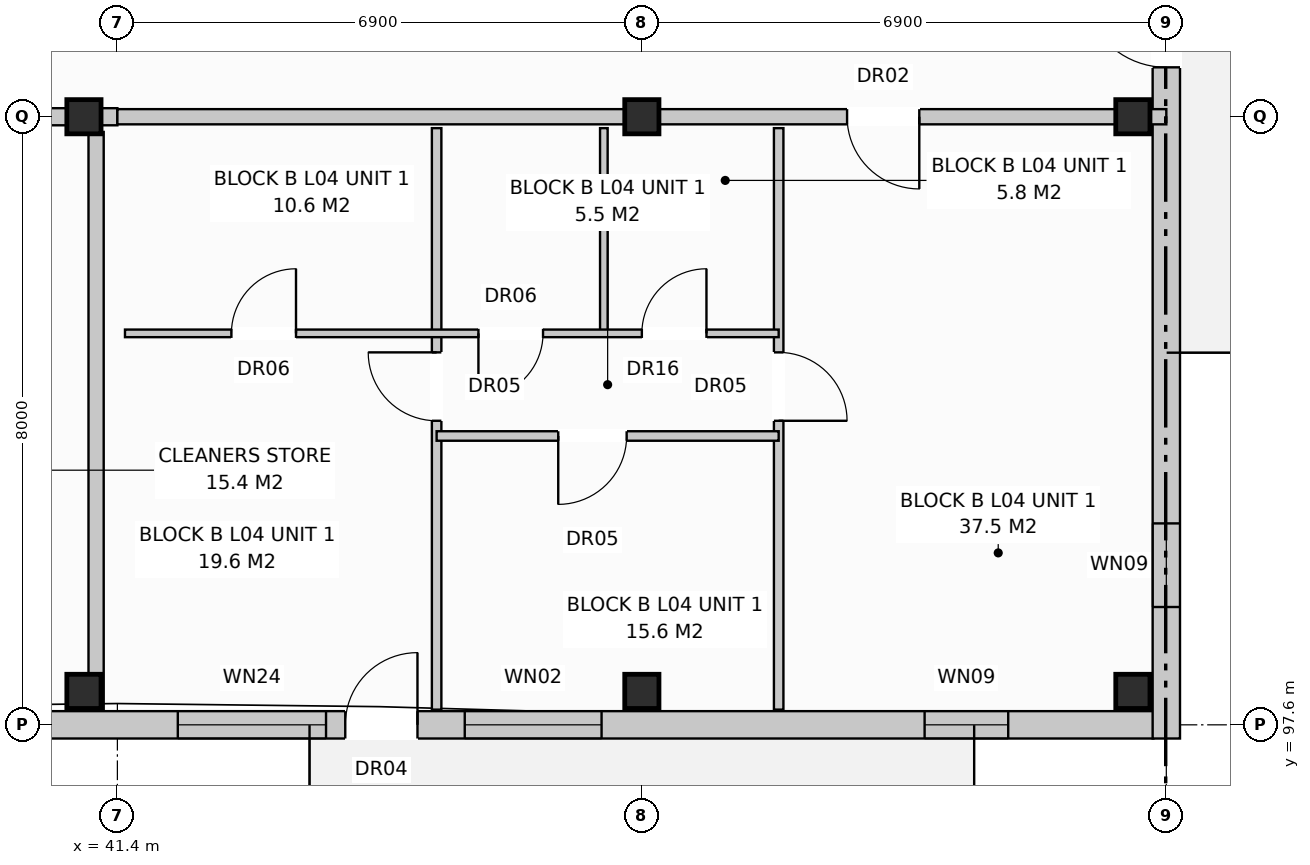
"""IFC4 building model, lengths in metres.
Left out: names, types, materials, properties, quantities, classifications, styles, units other than length and angle.
Written with IfcOpenShell. Run it as: python <this file> out.ifc"""

import sys

from ifc_helpers import new_model, si_unit, direction, frame, frame_2d, origin, origin_with_axes, origin_2d, place, context, subcontext, project, spatial, rectangle, extrude, element, fill, save


model = new_model("IFC4")
c1 = context("Model", 3, precision=1e-05, world=origin(), true_north=direction((0.0, 1.0)))
c2 = subcontext(c1, "Body", "Model", "MODEL_VIEW")
j1 = project(units=[si_unit("LENGTHUNIT", "METRE"), si_unit("PLANEANGLEUNIT", "RADIAN")], contexts=[c1])
p1 = place(None, origin())
s1 = spatial("IfcSite", under=j1, at=p1, CompositionType="ELEMENT")
p2 = place(p1, origin())
s2 = spatial("IfcBuilding", under=s1, at=p2, CompositionType="ELEMENT")
p3 = place(p2, frame((0.0, 0.0, 14.4)))
s3 = spatial("IfcBuildingStorey", under=s2, at=p3, CompositionType="ELEMENT", Elevation=14.4)
for number, where, z_axis, x_axis in (
    (1, (40.96, 98.04, 0.0), (0.0, 0.0, 1.0), (1.0, 0.0, 0.0)),
    (2, (40.96, 105.6, 0.0), (0.0, 0.0, 1.0), (1.0, 0.0, 0.0)),
    (3, (48.3, 98.04, 0.0), (0.0, 0.0, 1.0), (1.0, 0.0, 0.0)),
    (4, (48.3, 105.6, 0.0), (0.0, 0.0, 1.0), (1.0, 0.0, 0.0)),
    (5, (54.76, 98.04, 0.0), (0.0, 0.0, 1.0), (1.0, 0.0, 0.0)),
    (6, (54.76, 105.6, 0.0), (0.0, 0.0, 1.0), (1.0, 0.0, 0.0)),
):
    element("IfcColumn", number, at=place(p3, frame(where, z_axis=z_axis, x_axis=x_axis)), inside=s3, PredefinedType="COLUMN", context=c2, shape_type="SweptSolid", body=[
        extrude(rectangle(XDim=0.45, YDim=0.45, at=origin_2d()), origin(), (0.0, 0.0, 1.0), 3.2),
    ])
p4 = place(p3, frame((31.35, 97.6, 0.0), z_axis=(0.0, 0.0, 1.0), x_axis=(1.0, 0.0, 0.0)))
e7 = element("IfcWall", 7, at=p4, inside=s3, PredefinedType="STANDARD", context=c2, shape_type="SweptSolid", body=[
    extrude(rectangle(XDim=23.68, YDim=0.36, at=frame_2d((11.84, 0.0))), origin(), (0.0, 0.0, 1.0), 2.94),
])
p5 = place(p4, frame((13.048, 0.0, 0.0)))
e8 = element("IfcOpeningElement", 8, at=p5, cuts=e7, PredefinedType="OPENING", context=c2, shape_type="SweptSolid", body=[
    extrude(rectangle(XDim=0.95, YDim=2.1, at=frame_2d((0.475, 1.05))), frame((0.0, 0.192, 0.0), z_axis=(0.0, -1.0, 0.0), x_axis=(1.0, 0.0, 0.0)), (0.0, 0.0, 1.0), 0.384),
])
p6 = place(p4, frame((10.845, 0.0, 0.8)))
e9 = element("IfcOpeningElement", 9, at=p6, cuts=e7, PredefinedType="OPENING", context=c2, shape_type="SweptSolid", body=[
    extrude(rectangle(XDim=1.95, YDim=1.65, at=frame_2d((0.975, 0.825))), frame((0.0, 0.192, 0.0), z_axis=(0.0, -1.0, 0.0), x_axis=(1.0, 0.0, 0.0)), (0.0, 0.0, 1.0), 0.384),
])
p7 = place(p4, frame((14.62, 0.0, 0.8)))
e10 = element("IfcOpeningElement", 10, at=p7, cuts=e7, PredefinedType="OPENING", context=c2, shape_type="SweptSolid", body=[
    extrude(rectangle(XDim=1.8, YDim=1.7, at=frame_2d((0.9, 0.85))), frame((0.0, 0.192, 0.0), z_axis=(0.0, -1.0, 0.0), x_axis=(1.0, 0.0, 0.0)), (0.0, 0.0, 1.0), 0.384),
])
p8 = place(p4, frame((20.67, 0.0, 0.72)))
e11 = element("IfcOpeningElement", 11, at=p8, cuts=e7, PredefinedType="OPENING", context=c2, shape_type="SweptSolid", body=[
    extrude(rectangle(XDim=1.1, YDim=1.5, at=frame_2d((0.55, 0.75))), frame((0.0, 0.192, 0.0), z_axis=(0.0, -1.0, 0.0), x_axis=(1.0, 0.0, 0.0)), (0.0, 0.0, 1.0), 0.384),
])
p9 = place(p3, frame((55.2, 97.42, 0.0), z_axis=(0.0, 0.0, 1.0), x_axis=(0.0, 1.0, 0.0)))
e12 = element("IfcWall", 12, at=p9, inside=s3, PredefinedType="STANDARD", context=c2, shape_type="SweptSolid", body=[
    extrude(rectangle(XDim=18.76, YDim=0.36, at=frame_2d((9.38, 0.0))), origin(), (0.0, 0.0, 1.0), 2.94),
])
p10 = place(p9, frame((8.83, 0.0, 0.0)))
e13 = element("IfcOpeningElement", 13, at=p10, cuts=e12, PredefinedType="OPENING", context=c2, shape_type="SweptSolid", body=[
    extrude(rectangle(XDim=1.1, YDim=2.1, at=frame_2d((0.55, 1.05))), frame((0.0, 0.192, 0.0), z_axis=(0.0, -1.0, 0.0), x_axis=(1.0, 0.0, 0.0)), (0.0, 0.0, 1.0), 0.384),
])
p11 = place(p9, frame((1.73, 0.0, 0.72)))
e14 = element("IfcOpeningElement", 14, at=p11, cuts=e12, PredefinedType="OPENING", context=c2, shape_type="SweptSolid", body=[
    extrude(rectangle(XDim=1.1, YDim=1.5, at=frame_2d((0.55, 0.75))), frame((0.0, 0.192, 0.0), z_axis=(0.0, -1.0, 0.0), x_axis=(1.0, 0.0, 0.0)), (0.0, 0.0, 1.0), 0.384),
])
p12 = place(p9, frame((15.93, 0.0, 0.72)))
e15 = element("IfcOpeningElement", 15, at=p12, cuts=e12, PredefinedType="OPENING", context=c2, shape_type="SweptSolid", body=[
    extrude(rectangle(XDim=1.1, YDim=1.5, at=frame_2d((0.55, 0.75))), frame((0.0, 0.192, 0.0), z_axis=(0.0, -1.0, 0.0), x_axis=(1.0, 0.0, 0.0)), (0.0, 0.0, 1.0), 0.384),
])
p13 = place(p3, frame((41.12, 97.8, 0.0), z_axis=(0.0, 0.0, 1.0), x_axis=(0.0, 1.0, 0.0)))
e16 = element("IfcWall", 16, at=p13, inside=s3, PredefinedType="PARTITIONING", context=c2, shape_type="SweptSolid", body=[
    extrude(rectangle(XDim=7.6, YDim=0.2, at=frame_2d((3.8, 0.0))), origin(), (0.0, 0.0, 1.0), 2.94),
])
p14 = place(p3, frame((31.5, 105.6, 0.0), z_axis=(0.0, 0.0, 1.0), x_axis=(1.0, 0.0, 0.0)))
e17 = element("IfcWall", 17, at=p14, inside=s3, PredefinedType="PARTITIONING", context=c2, shape_type="SweptSolid", body=[
    extrude(rectangle(XDim=9.9, YDim=0.225, at=frame_2d((4.95, 0.0))), origin(), (0.0, 0.0, 1.0), 2.38),
])
p15 = place(p14, frame((0.475, 0.0, 0.0)))
e18 = element("IfcOpeningElement", 18, at=p15, cuts=e17, PredefinedType="OPENING", context=c2, shape_type="SweptSolid", body=[
    extrude(rectangle(XDim=1.1, YDim=2.15, at=frame_2d((0.55, 1.075))), frame((0.0, 0.125, 0.0), z_axis=(0.0, -1.0, 0.0), x_axis=(1.0, 0.0, 0.0)), (0.0, 0.0, 1.0), 0.249),
])
p16 = place(p14, frame((5.75, 0.0, 0.0)))
e19 = element("IfcOpeningElement", 19, at=p16, cuts=e17, PredefinedType="OPENING", context=c2, shape_type="SweptSolid", body=[
    extrude(rectangle(XDim=0.9, YDim=2.1, at=frame_2d((0.45, 1.05))), frame((0.0, 0.125, 0.0), z_axis=(0.0, -1.0, 0.0), x_axis=(1.0, 0.0, 0.0)), (0.0, 0.0, 1.0), 0.249),
])
p17 = place(p14, frame((7.8, 0.0, 0.0)))
e20 = element("IfcOpeningElement", 20, at=p17, cuts=e17, PredefinedType="OPENING", context=c2, shape_type="SweptSolid", body=[
    extrude(rectangle(XDim=0.95, YDim=2.15, at=frame_2d((0.475, 1.075))), frame((0.0, 0.125, 0.0), z_axis=(0.0, -1.0, 0.0), x_axis=(1.0, 0.0, 0.0)), (0.0, 0.0, 1.0), 0.249),
])
p18 = place(p3, frame((41.4, 105.6, 0.0), z_axis=(0.0, 0.0, 1.0), x_axis=(1.0, 0.0, 0.0)))
e21 = element("IfcWall", 21, at=p18, inside=s3, PredefinedType="PARTITIONING", context=c2, shape_type="SweptSolid", body=[
    extrude(rectangle(XDim=13.8, YDim=0.2, at=frame_2d((6.9, 0.0))), origin(), (0.0, 0.0, 1.0), 2.38),
])
p19 = place(p18, frame((9.6, 0.0, 0.0)))
e22 = element("IfcOpeningElement", 22, at=p19, cuts=e21, PredefinedType="OPENING", context=c2, shape_type="SweptSolid", body=[
    extrude(rectangle(XDim=0.95, YDim=2.15, at=frame_2d((0.475, 1.075))), frame((0.0, 0.112, 0.0), z_axis=(0.0, -1.0, 0.0), x_axis=(1.0, 0.0, 0.0)), (0.0, 0.0, 1.0), 0.224),
])
p20 = place(p3, frame((50.1, 105.45, 0.0), z_axis=(0.0, 0.0, 1.0), x_axis=(0.0, -1.0, 0.0)))
e23 = element("IfcWall", 23, at=p20, inside=s3, PredefinedType="PARTITIONING", context=c2, shape_type="SweptSolid", body=[
    extrude(rectangle(XDim=7.65, YDim=0.125, at=frame_2d((3.825, 0.0))), origin(), (0.0, 0.0, 1.0), 2.94),
])
p21 = place(p20, frame((2.95, 0.0, 0.0)))
e24 = element("IfcOpeningElement", 24, at=p21, cuts=e23, PredefinedType="OPENING", context=c2, shape_type="SweptSolid", body=[
    extrude(rectangle(XDim=0.9, YDim=2.1, at=frame_2d((0.45, 1.05))), frame((0.0, 0.074, 0.0), z_axis=(0.0, -1.0, 0.0), x_axis=(1.0, 0.0, 0.0)), (0.0, 0.0, 1.0), 0.149),
])
p22 = place(p3, frame((45.6, 105.45, 0.0), z_axis=(0.0, 0.0, 1.0), x_axis=(0.0, -1.0, 0.0)))
e25 = element("IfcWall", 25, at=p22, inside=s3, PredefinedType="PARTITIONING", context=c2, shape_type="SweptSolid", body=[
    extrude(rectangle(XDim=7.65, YDim=0.125, at=frame_2d((3.825, 0.0))), origin(), (0.0, 0.0, 1.0), 2.94),
])
p23 = place(p22, frame((2.95, 0.0, 0.0)))
e26 = element("IfcOpeningElement", 26, at=p23, cuts=e25, PredefinedType="OPENING", context=c2, shape_type="SweptSolid", body=[
    extrude(rectangle(XDim=0.9, YDim=2.1, at=frame_2d((0.45, 1.05))), frame((0.0, 0.074, 0.0), z_axis=(0.0, -1.0, 0.0), x_axis=(1.0, 0.0, 0.0)), (0.0, 0.0, 1.0), 0.149),
])
p24 = place(p3, frame((47.8, 105.45, 0.0), z_axis=(0.0, 0.0, 1.0), x_axis=(0.0, -1.0, 0.0)))
e27 = element("IfcWall", 27, at=p24, inside=s3, PredefinedType="PARTITIONING", context=c2, shape_type="SweptSolid", body=[
    extrude(rectangle(XDim=2.7, YDim=0.1, at=frame_2d((1.35, 0.0))), origin(), (0.0, 0.0, 1.0), 2.94),
])
p25 = place(p3, frame((41.5, 102.75, 0.0), z_axis=(0.0, 0.0, 1.0), x_axis=(1.0, 0.0, 0.0)))
e28 = element("IfcWall", 28, at=p25, inside=s3, PredefinedType="PARTITIONING", context=c2, shape_type="SweptSolid", body=[
    extrude(rectangle(XDim=8.6, YDim=0.1, at=frame_2d((4.3, 0.0))), origin(), (0.0, 0.0, 1.0), 2.94),
])
p26 = place(p25, frame((1.4, 0.0, 0.0)))
e29 = element("IfcOpeningElement", 29, at=p26, cuts=e28, PredefinedType="OPENING", context=c2, shape_type="SweptSolid", body=[
    extrude(rectangle(XDim=0.85, YDim=2.05, at=frame_2d((0.425, 1.025))), frame((0.0, 0.062, 0.0), z_axis=(0.0, -1.0, 0.0), x_axis=(1.0, 0.0, 0.0)), (0.0, 0.0, 1.0), 0.124),
])
p27 = place(p25, frame((4.65, 0.0, 0.0)))
e30 = element("IfcOpeningElement", 30, at=p27, cuts=e28, PredefinedType="OPENING", context=c2, shape_type="SweptSolid", body=[
    extrude(rectangle(XDim=0.85, YDim=2.05, at=frame_2d((0.425, 1.025))), frame((0.0, 0.062, 0.0), z_axis=(0.0, -1.0, 0.0), x_axis=(1.0, 0.0, 0.0)), (0.0, 0.0, 1.0), 0.124),
])
p28 = place(p25, frame((6.8, 0.0, 0.0)))
e31 = element("IfcOpeningElement", 31, at=p28, cuts=e28, PredefinedType="OPENING", context=c2, shape_type="SweptSolid", body=[
    extrude(rectangle(XDim=0.85, YDim=2.1, at=frame_2d((0.425, 1.05))), frame((0.0, 0.062, 0.0), z_axis=(0.0, -1.0, 0.0), x_axis=(1.0, 0.0, 0.0)), (0.0, 0.0, 1.0), 0.124),
])
p29 = place(p3, frame((45.6, 101.4, 0.0), z_axis=(0.0, 0.0, 1.0), x_axis=(1.0, 0.0, 0.0)))
e32 = element("IfcWall", 32, at=p29, inside=s3, PredefinedType="PARTITIONING", context=c2, shape_type="SweptSolid", body=[
    extrude(rectangle(XDim=4.5, YDim=0.125, at=frame_2d((2.25, 0.0))), origin(), (0.0, 0.0, 1.0), 2.94),
])
p30 = place(p29, frame((1.6, 0.0, 0.0)))
e33 = element("IfcOpeningElement", 33, at=p30, cuts=e32, PredefinedType="OPENING", context=c2, shape_type="SweptSolid", body=[
    extrude(rectangle(XDim=0.9, YDim=2.1, at=frame_2d((0.45, 1.05))), frame((0.0, 0.074, 0.0), z_axis=(0.0, -1.0, 0.0), x_axis=(1.0, 0.0, 0.0)), (0.0, 0.0, 1.0), 0.149),
])
p31 = place(p5, origin_with_axes())
e34 = element("IfcDoor", 34, at=p31, inside=s3, OperationType="SINGLE_SWING_RIGHT", PredefinedType="DOOR", context=c2, shape_type="SweptSolid", body=[
    extrude(rectangle(XDim=0.95, YDim=2.1, at=frame_2d((0.475, 1.05))), frame((0.0, 0.025, 0.0), z_axis=(0.0, -1.0, 0.0), x_axis=(1.0, 0.0, 0.0)), (0.0, 0.0, 1.0), 0.05),
])
fill(e8, e34)
p32 = place(p6, origin_with_axes())
e35 = element("IfcWindow", 35, at=p32, inside=s3, PartitioningType="SINGLE_PANEL", PredefinedType="WINDOW", context=c2, shape_type="SweptSolid", body=[
    extrude(rectangle(XDim=1.95, YDim=1.65, at=frame_2d((0.975, 0.825))), frame((0.0, 0.03, 0.0), z_axis=(0.0, -1.0, 0.0), x_axis=(1.0, 0.0, 0.0)), (0.0, 0.0, 1.0), 0.06),
])
fill(e9, e35)
p33 = place(p7, origin_with_axes())
e36 = element("IfcWindow", 36, at=p33, inside=s3, PartitioningType="SINGLE_PANEL", PredefinedType="WINDOW", context=c2, shape_type="SweptSolid", body=[
    extrude(rectangle(XDim=1.8, YDim=1.7, at=frame_2d((0.9, 0.85))), frame((0.0, 0.03, 0.0), z_axis=(0.0, -1.0, 0.0), x_axis=(1.0, 0.0, 0.0)), (0.0, 0.0, 1.0), 0.06),
])
fill(e10, e36)
p34 = place(p8, origin_with_axes())
e37 = element("IfcWindow", 37, at=p34, inside=s3, PartitioningType="SINGLE_PANEL", PredefinedType="WINDOW", context=c2, shape_type="SweptSolid", body=[
    extrude(rectangle(XDim=1.1, YDim=1.5, at=frame_2d((0.55, 0.75))), frame((0.0, 0.03, 0.0), z_axis=(0.0, -1.0, 0.0), x_axis=(1.0, 0.0, 0.0)), (0.0, 0.0, 1.0), 0.06),
])
fill(e11, e37)
p35 = place(p10, origin_with_axes())
e38 = element("IfcDoor", 38, at=p35, inside=s3, OperationType="SINGLE_SWING_RIGHT", PredefinedType="DOOR", context=c2, shape_type="SweptSolid", body=[
    extrude(rectangle(XDim=1.1, YDim=2.1, at=frame_2d((0.55, 1.05))), frame((0.0, 0.025, 0.0), z_axis=(0.0, -1.0, 0.0), x_axis=(1.0, 0.0, 0.0)), (0.0, 0.0, 1.0), 0.05),
])
fill(e13, e38)
p36 = place(p11, origin_with_axes())
e39 = element("IfcWindow", 39, at=p36, inside=s3, PartitioningType="SINGLE_PANEL", PredefinedType="WINDOW", context=c2, shape_type="SweptSolid", body=[
    extrude(rectangle(XDim=1.1, YDim=1.5, at=frame_2d((0.55, 0.75))), frame((0.0, 0.03, 0.0), z_axis=(0.0, -1.0, 0.0), x_axis=(1.0, 0.0, 0.0)), (0.0, 0.0, 1.0), 0.06),
])
fill(e14, e39)
p37 = place(p19, frame((0.95, 0.0, 0.0), z_axis=(0.0, 0.0, 1.0), x_axis=(-1.0, 0.0, 0.0)))
e40 = element("IfcDoor", 40, at=p37, inside=s3, OperationType="SINGLE_SWING_RIGHT", PredefinedType="DOOR", context=c2, shape_type="SweptSolid", body=[
    extrude(rectangle(XDim=0.95, YDim=2.15, at=frame_2d((0.475, 1.075))), frame((0.0, 0.025, 0.0), z_axis=(0.0, -1.0, 0.0), x_axis=(1.0, 0.0, 0.0)), (0.0, 0.0, 1.0), 0.05),
])
fill(e22, e40)
p38 = place(p21, origin_with_axes())
e41 = element("IfcDoor", 41, at=p38, inside=s3, OperationType="SINGLE_SWING_RIGHT", PredefinedType="DOOR", context=c2, shape_type="SweptSolid", body=[
    extrude(rectangle(XDim=0.9, YDim=2.1, at=frame_2d((0.45, 1.05))), frame((0.0, 0.025, 0.0), z_axis=(0.0, -1.0, 0.0), x_axis=(1.0, 0.0, 0.0)), (0.0, 0.0, 1.0), 0.05),
])
fill(e24, e41)
p39 = place(p23, frame((0.9, 0.0, 0.0), z_axis=(0.0, 0.0, 1.0), x_axis=(-1.0, 0.0, 0.0)))
e42 = element("IfcDoor", 42, at=p39, inside=s3, OperationType="SINGLE_SWING_LEFT", PredefinedType="DOOR", context=c2, shape_type="SweptSolid", body=[
    extrude(rectangle(XDim=0.9, YDim=2.1, at=frame_2d((0.45, 1.05))), frame((0.0, 0.025, 0.0), z_axis=(0.0, -1.0, 0.0), x_axis=(1.0, 0.0, 0.0)), (0.0, 0.0, 1.0), 0.05),
])
fill(e26, e42)
p40 = place(p26, origin_with_axes())
e43 = element("IfcDoor", 43, at=p40, inside=s3, OperationType="SINGLE_SWING_RIGHT", PredefinedType="DOOR", context=c2, shape_type="SweptSolid", body=[
    extrude(rectangle(XDim=0.85, YDim=2.05, at=frame_2d((0.425, 1.025))), frame((0.0, 0.025, 0.0), z_axis=(0.0, -1.0, 0.0), x_axis=(1.0, 0.0, 0.0)), (0.0, 0.0, 1.0), 0.05),
])
fill(e29, e43)
p41 = place(p27, frame((0.85, 0.0, 0.0), z_axis=(0.0, 0.0, 1.0), x_axis=(-1.0, 0.0, 0.0)))
e44 = element("IfcDoor", 44, at=p41, inside=s3, OperationType="SINGLE_SWING_LEFT", PredefinedType="DOOR", context=c2, shape_type="SweptSolid", body=[
    extrude(rectangle(XDim=0.85, YDim=2.05, at=frame_2d((0.425, 1.025))), frame((0.0, 0.025, 0.0), z_axis=(0.0, -1.0, 0.0), x_axis=(1.0, 0.0, 0.0)), (0.0, 0.0, 1.0), 0.05),
])
fill(e30, e44)
p42 = place(p28, origin_with_axes())
e45 = element("IfcDoor", 45, at=p42, inside=s3, OperationType="SINGLE_SWING_RIGHT", PredefinedType="DOOR", context=c2, shape_type="SweptSolid", body=[
    extrude(rectangle(XDim=0.85, YDim=2.1, at=frame_2d((0.425, 1.05))), frame((0.0, 0.025, 0.0), z_axis=(0.0, -1.0, 0.0), x_axis=(1.0, 0.0, 0.0)), (0.0, 0.0, 1.0), 0.05),
])
fill(e31, e45)
p43 = place(p30, frame((0.9, 0.0, 0.0), z_axis=(0.0, 0.0, 1.0), x_axis=(-1.0, 0.0, 0.0)))
e46 = element("IfcDoor", 46, at=p43, inside=s3, OperationType="SINGLE_SWING_LEFT", PredefinedType="DOOR", context=c2, shape_type="SweptSolid", body=[
    extrude(rectangle(XDim=0.9, YDim=2.1, at=frame_2d((0.45, 1.05))), frame((0.0, 0.025, 0.0), z_axis=(0.0, -1.0, 0.0), x_axis=(1.0, 0.0, 0.0)), (0.0, 0.0, 1.0), 0.05),
])
fill(e33, e46)
save(model, sys.argv[1])
